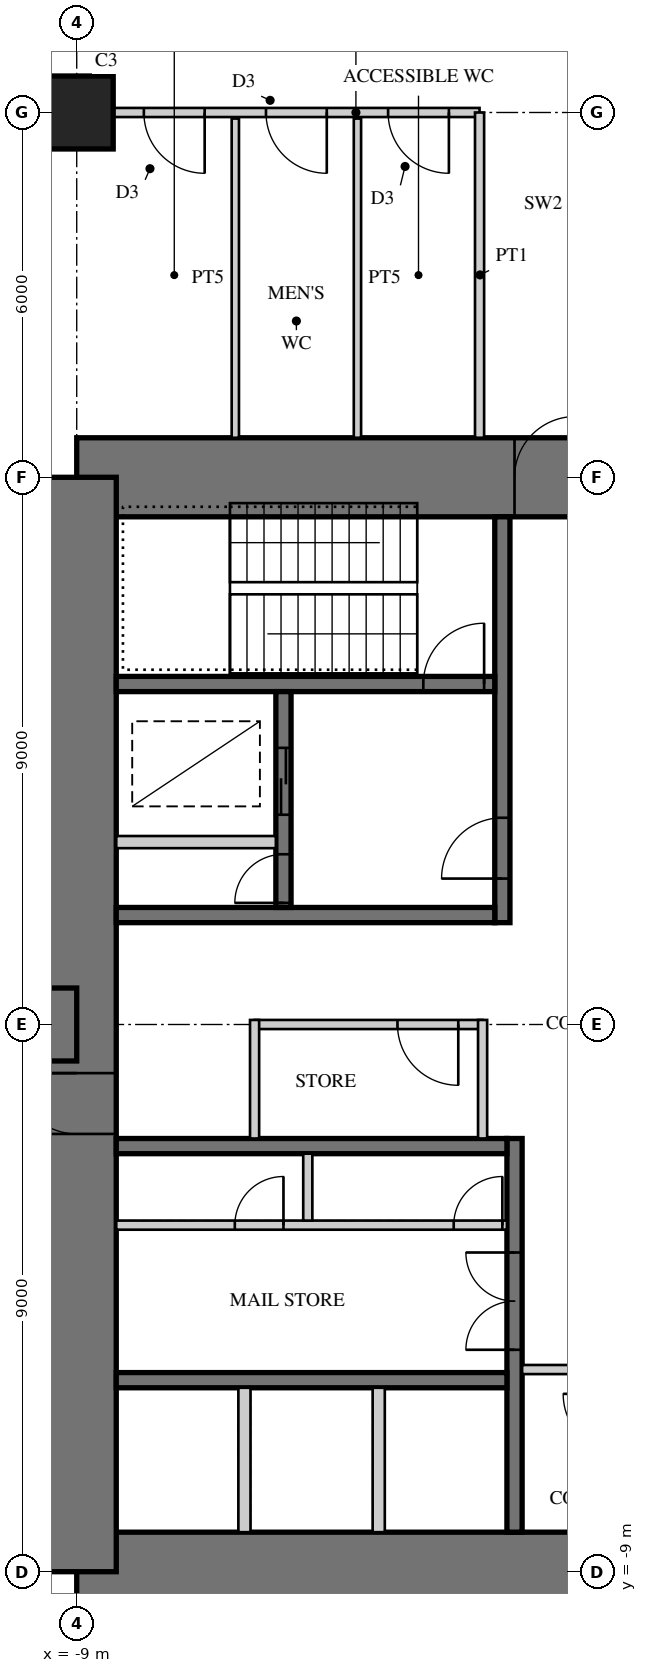
"""IFC4 building model, lengths in metres.
Left out: names, types, materials, properties, quantities, classifications, styles, units other than length and angle.
Written with IfcOpenShell. Run it as: python <this file> out.ifc"""

import sys

from ifc_helpers import new_model, si_unit, direction, frame, frame_2d, origin, origin_2d, place, context, subcontext, project, spatial, rectangle, extrude, element, fill, save


model = new_model("IFC4")
c1 = context("Model", 3, precision=1e-05, world=origin(), true_north=direction((0.0, 1.0)))
c2 = subcontext(c1, "Body", "Model", "MODEL_VIEW")
j1 = project(units=[si_unit("LENGTHUNIT", "METRE"), si_unit("PLANEANGLEUNIT", "RADIAN")], contexts=[c1])
p1 = place(None, origin())
s1 = spatial("IfcSite", under=j1, at=p1, CompositionType="ELEMENT")
p2 = place(p1, origin())
s2 = spatial("IfcBuilding", under=s1, at=p2, CompositionType="ELEMENT")
p3 = place(p2, frame((0.0, 0.0, 91.5)))
s3 = spatial("IfcBuildingStorey", under=s2, at=p3, CompositionType="ELEMENT", Elevation=91.5)
p4 = place(p3, frame((9.0, 9.0, 0.0), z_axis=(0.0, 0.0, 1.0), x_axis=(-1.0, 0.0, 0.0)))
e1 = element("IfcWall", 1, at=p4, inside=s3, PredefinedType="SHEAR", context=c2, shape_type="SweptSolid", body=[
    extrude(rectangle(XDim=18.0, YDim=1.3, at=frame_2d((9.0, 0.0))), origin(), (0.0, 0.0, 1.0), 4.0),
])
p5 = place(p4, frame((9.8, 0.0, 0.0)))
e2 = element("IfcOpeningElement", 2, at=p5, cuts=e1, PredefinedType="OPENING", context=c2, shape_type="SweptSolid", body=[
    extrude(rectangle(XDim=1.0, YDim=2.4, at=frame_2d((0.5, 1.2))), frame((0.0, 0.66, 0.0), z_axis=(0.0, -1.0, 0.0), x_axis=(1.0, 0.0, 0.0)), (0.0, 0.0, 1.0), 1.32),
])
p6 = place(p3, frame((-9.0, -9.0, 0.0), z_axis=(0.0, 0.0, 1.0), x_axis=(1.0, 0.0, 0.0)))
e3 = element("IfcWall", 3, at=p6, inside=s3, PredefinedType="SHEAR", context=c2, shape_type="SweptSolid", body=[
    extrude(rectangle(XDim=18.0, YDim=1.3, at=frame_2d((9.0, 0.0))), origin(), (0.0, 0.0, 1.0), 4.0),
])
p7 = place(p6, frame((9.8, 0.0, 0.0)))
e4 = element("IfcOpeningElement", 4, at=p7, cuts=e3, PredefinedType="OPENING", context=c2, shape_type="SweptSolid", body=[
    extrude(rectangle(XDim=1.0, YDim=2.4, at=frame_2d((0.5, 1.2))), frame((0.0, 0.66, 0.0), z_axis=(0.0, -1.0, 0.0), x_axis=(1.0, 0.0, 0.0)), (0.0, 0.0, 1.0), 1.32),
])
p8 = place(p3, frame((-9.0, 9.0, 0.0), z_axis=(0.0, 0.0, 1.0), x_axis=(0.0, -1.0, 0.0)))
e5 = element("IfcWall", 5, at=p8, inside=s3, PredefinedType="SHEAR", context=c2, shape_type="SweptSolid", body=[
    extrude(rectangle(XDim=18.0, YDim=1.3, at=frame_2d((9.0, 0.0))), origin(), (0.0, 0.0, 1.0), 4.0),
])
p9 = place(p8, frame((9.8, 0.0, 0.0)))
e6 = element("IfcOpeningElement", 6, at=p9, cuts=e5, PredefinedType="OPENING", context=c2, shape_type="SweptSolid", body=[
    extrude(rectangle(XDim=1.0, YDim=2.4, at=frame_2d((0.5, 1.2))), frame((0.0, 0.66, 0.0), z_axis=(0.0, -1.0, 0.0), x_axis=(1.0, 0.0, 0.0)), (0.0, 0.0, 1.0), 1.32),
])
p10 = place(p3, frame((-2.0, 1.675, 0.0), z_axis=(0.0, 0.0, 1.0), x_axis=(0.0, 1.0, 0.0)))
e7 = element("IfcWall", 7, at=p10, inside=s3, PredefinedType="SHEAR", context=c2, shape_type="SweptSolid", body=[
    extrude(rectangle(XDim=6.675, YDim=0.25, at=frame_2d((3.337, 0.0))), origin(), (0.0, 0.0, 1.0), 4.0),
])
p11 = place(p10, frame((0.725, 0.0, 0.0)))
e8 = element("IfcOpeningElement", 8, at=p11, cuts=e7, PredefinedType="OPENING", context=c2, shape_type="SweptSolid", body=[
    extrude(rectangle(XDim=1.0, YDim=2.1, at=frame_2d((0.5, 1.05))), frame((0.0, 0.135, 0.0), z_axis=(0.0, -1.0, 0.0), x_axis=(1.0, 0.0, 0.0)), (0.0, 0.0, 1.0), 0.27),
])
p12 = place(p3, frame((-2.125, 1.8, 0.0), z_axis=(0.0, 0.0, 1.0), x_axis=(-1.0, 0.0, 0.0)))
e9 = element("IfcWall", 9, at=p12, inside=s3, PredefinedType="SHEAR", context=c2, shape_type="SweptSolid", body=[
    extrude(rectangle(XDim=6.225, YDim=0.25, at=frame_2d((3.113, 0.0))), origin(), (0.0, 0.0, 1.0), 4.0),
])
p13 = place(p3, frame((-2.125, 5.6, 0.0), z_axis=(0.0, 0.0, 1.0), x_axis=(-1.0, 0.0, 0.0)))
e10 = element("IfcWall", 10, at=p13, inside=s3, PredefinedType="SHEAR", context=c2, shape_type="SweptSolid", body=[
    extrude(rectangle(XDim=6.225, YDim=0.25, at=frame_2d((3.113, 0.0))), origin(), (0.0, 0.0, 1.0), 4.0),
])
p14 = place(p13, frame((0.175, 0.0, 0.0)))
e11 = element("IfcOpeningElement", 11, at=p14, cuts=e10, PredefinedType="OPENING", context=c2, shape_type="SweptSolid", body=[
    extrude(rectangle(XDim=1.0, YDim=2.1, at=frame_2d((0.5, 1.05))), frame((0.0, 0.135, 0.0), z_axis=(0.0, -1.0, 0.0), x_axis=(1.0, 0.0, 0.0)), (0.0, 0.0, 1.0), 0.27),
])
p15 = place(p3, frame((-5.6, 1.925, 0.0), z_axis=(0.0, 0.0, 1.0), x_axis=(0.0, 1.0, 0.0)))
e12 = element("IfcWall", 12, at=p15, inside=s3, PredefinedType="SHEAR", context=c2, shape_type="SweptSolid", body=[
    extrude(rectangle(XDim=3.55, YDim=0.25, at=frame_2d((1.775, 0.0))), origin(), (0.0, 0.0, 1.0), 4.0),
])
p16 = place(p15, frame((1.525, 0.0, 0.0)))
e13 = element("IfcOpeningElement", 13, at=p16, cuts=e12, PredefinedType="OPENING", context=c2, shape_type="SweptSolid", body=[
    extrude(rectangle(XDim=1.1, YDim=2.2, at=frame_2d((0.55, 1.1))), frame((0.0, 0.135, 0.0), z_axis=(0.0, -1.0, 0.0), x_axis=(1.0, 0.0, 0.0)), (0.0, 0.0, 1.0), 0.27),
])
p17 = place(p15, frame((0.075, 0.0, 0.0)))
e14 = element("IfcOpeningElement", 14, at=p17, cuts=e12, PredefinedType="OPENING", context=c2, shape_type="SweptSolid", body=[
    extrude(rectangle(XDim=0.8, YDim=2.1, at=frame_2d((0.4, 1.05))), frame((0.0, 0.135, 0.0), z_axis=(0.0, -1.0, 0.0), x_axis=(1.0, 0.0, 0.0)), (0.0, 0.0, 1.0), 0.27),
])
p18 = place(p3, frame((-5.725, 3.0, 0.0), z_axis=(0.0, 0.0, 1.0), x_axis=(-1.0, 0.0, 0.0)))
e15 = element("IfcWall", 15, at=p18, inside=s3, PredefinedType="PARTITIONING", context=c2, shape_type="SweptSolid", body=[
    extrude(rectangle(XDim=2.625, YDim=0.2, at=frame_2d((1.312, 0.0))), origin(), (0.0, 0.0, 1.0), 4.0),
])
p19 = place(p3, frame((-1.8, -1.875, 0.0), z_axis=(0.0, 0.0, 1.0), x_axis=(0.0, -1.0, 0.0)))
e16 = element("IfcWall", 16, at=p19, inside=s3, PredefinedType="SHEAR", context=c2, shape_type="SweptSolid", body=[
    extrude(rectangle(XDim=6.475, YDim=0.25, at=frame_2d((3.238, 0.0))), origin(), (0.0, 0.0, 1.0), 4.0),
])
p20 = place(p19, frame((1.875, 0.0, 0.0)))
e17 = element("IfcOpeningElement", 17, at=p20, cuts=e16, PredefinedType="OPENING", context=c2, shape_type="SweptSolid", body=[
    extrude(rectangle(XDim=1.6, YDim=2.4, at=frame_2d((0.8, 1.2))), frame((0.0, 0.135, 0.0), z_axis=(0.0, -1.0, 0.0), x_axis=(1.0, 0.0, 0.0)), (0.0, 0.0, 1.0), 0.27),
])
for number, where, z_axis, x_axis in (
    (18, (-1.925, -2.0, 0.0), (0.0, 0.0, 1.0), (-1.0, 0.0, 0.0)),
    (19, (-1.925, -5.85, 0.0), (0.0, 0.0, 1.0), (-1.0, 0.0, 0.0)),
):
    element("IfcWall", number, at=place(p3, frame(where, z_axis=z_axis, x_axis=x_axis)), inside=s3, PredefinedType="SHEAR", context=c2, shape_type="SweptSolid", body=[
        extrude(rectangle(XDim=6.425, YDim=0.25, at=frame_2d((3.212, 0.0))), origin(), (0.0, 0.0, 1.0), 4.0),
    ])
p21 = place(p3, frame((-1.925, -3.3, 0.0), z_axis=(0.0, 0.0, 1.0), x_axis=(-1.0, 0.0, 0.0)))
e20 = element("IfcWall", 20, at=p21, inside=s3, PredefinedType="PARTITIONING", context=c2, shape_type="SweptSolid", body=[
    extrude(rectangle(XDim=6.425, YDim=0.15, at=frame_2d((3.212, 0.0))), origin(), (0.0, 0.0, 1.0), 4.0),
])
p22 = place(p21, frame((0.075, 0.0, 0.0)))
e21 = element("IfcOpeningElement", 21, at=p22, cuts=e20, PredefinedType="OPENING", context=c2, shape_type="SweptSolid", body=[
    extrude(rectangle(XDim=0.8, YDim=2.1, at=frame_2d((0.4, 1.05))), frame((0.0, 0.085, 0.0), z_axis=(0.0, -1.0, 0.0), x_axis=(1.0, 0.0, 0.0)), (0.0, 0.0, 1.0), 0.17),
])
p23 = place(p21, frame((3.675, 0.0, 0.0)))
e22 = element("IfcOpeningElement", 22, at=p23, cuts=e20, PredefinedType="OPENING", context=c2, shape_type="SweptSolid", body=[
    extrude(rectangle(XDim=0.8, YDim=2.1, at=frame_2d((0.4, 1.05))), frame((0.0, 0.085, 0.0), z_axis=(0.0, -1.0, 0.0), x_axis=(1.0, 0.0, 0.0)), (0.0, 0.0, 1.0), 0.17),
])
p24 = place(p3, frame((-5.2, -2.125, 0.0), z_axis=(0.0, 0.0, 1.0), x_axis=(0.0, -1.0, 0.0)))
e23 = element("IfcWall", 23, at=p24, inside=s3, PredefinedType="PARTITIONING", context=c2, shape_type="SweptSolid", body=[
    extrude(rectangle(XDim=1.1, YDim=0.15, at=frame_2d((0.55, 0.0))), origin(), (0.0, 0.0, 1.0), 4.0),
])
for number, where, z_axis, x_axis in (
    (24, (-4.033, -5.975, 0.0), (0.0, 0.0, 1.0), (0.0, -1.0, 0.0)),
    (25, (-6.242, -5.975, 0.0), (0.0, 0.0, 1.0), (0.0, -1.0, 0.0)),
):
    element("IfcWall", number, at=place(p3, frame(where, z_axis=z_axis, x_axis=x_axis)), inside=s3, PredefinedType="PARTITIONING", context=c2, shape_type="SweptSolid", body=[
        extrude(rectangle(XDim=2.375, YDim=0.2, at=frame_2d((1.188, 0.0))), origin(), (0.0, 0.0, 1.0), 4.0),
    ])
p25 = place(p3, frame((-9.0, 0.0, 0.0), z_axis=(0.0, 0.0, 1.0), x_axis=(-1.0, 0.0, 0.0)))
e26 = element("IfcWall", 26, at=p25, inside=s3, PredefinedType="SHEAR", context=c2, shape_type="SweptSolid", body=[
    extrude(rectangle(XDim=18.0, YDim=1.2, at=frame_2d((9.0, 0.0))), origin(), (0.0, 0.0, 1.0), 4.0),
])
p26 = place(p25, frame((9.9, 0.0, 0.0)))
e27 = element("IfcOpeningElement", 27, at=p26, cuts=e26, PredefinedType="OPENING", context=c2, shape_type="SweptSolid", body=[
    extrude(rectangle(XDim=1.0, YDim=2.2, at=frame_2d((0.5, 1.1))), frame((0.0, 0.61, 0.0), z_axis=(0.0, -1.0, 0.0), x_axis=(1.0, 0.0, 0.0)), (0.0, 0.0, 1.0), 1.22),
])
p27 = place(p3, frame((-9.0, 15.0, 0.0), z_axis=(0.0, 0.0, 1.0), x_axis=(1.0, 0.0, 0.0)))
e28 = element("IfcColumn", 28, at=p27, inside=s3, PredefinedType="COLUMN", context=c2, shape_type="SweptSolid", body=[
    extrude(rectangle(XDim=1.2, YDim=1.2, at=origin_2d()), origin(), (0.0, 0.0, 1.0), 4.0),
])
p28 = place(p3, frame((-2.325, 0.0, 0.0), z_axis=(0.0, 0.0, 1.0), x_axis=(-1.0, 0.0, 0.0)))
e29 = element("IfcWall", 29, at=p28, inside=s3, PredefinedType="PARTITIONING", context=c2, shape_type="SweptSolid", body=[
    extrude(rectangle(XDim=3.75, YDim=0.15, at=frame_2d((1.875, 0.0))), origin(), (0.0, 0.0, 1.0), 3.75),
])
p29 = place(p28, frame((0.4, 0.0, 0.0)))
e30 = element("IfcOpeningElement", 30, at=p29, cuts=e29, PredefinedType="OPENING", context=c2, shape_type="SweptSolid", body=[
    extrude(rectangle(XDim=1.0, YDim=2.1, at=frame_2d((0.5, 1.05))), frame((0.0, 0.085, 0.0), z_axis=(0.0, -1.0, 0.0), x_axis=(1.0, 0.0, 0.0)), (0.0, 0.0, 1.0), 0.17),
])
for number, where, z_axis, x_axis in (
    (31, (-2.325, -1.875, 0.0), (0.0, 0.0, 1.0), (0.0, 1.0, 0.0)),
    (32, (-6.075, 0.075, 0.0), (0.0, 0.0, 1.0), (0.0, -1.0, 0.0)),
):
    element("IfcWall", number, at=place(p3, frame(where, z_axis=z_axis, x_axis=x_axis)), inside=s3, PredefinedType="PARTITIONING", context=c2, shape_type="SweptSolid", body=[
        extrude(rectangle(XDim=1.95, YDim=0.15, at=frame_2d((0.975, 0.0))), origin(), (0.0, 0.0, 1.0), 3.75),
    ])
p30 = place(p3, frame((-1.675, -5.675, 0.0), z_axis=(0.0, 0.0, 1.0), x_axis=(1.0, 0.0, 0.0)))
e33 = element("IfcWall", 33, at=p30, inside=s3, PredefinedType="PARTITIONING", context=c2, shape_type="SweptSolid", body=[
    extrude(rectangle(XDim=1.75, YDim=0.15, at=frame_2d((0.875, 0.0))), origin(), (0.0, 0.0, 1.0), 3.75),
])
p31 = place(p3, frame((-2.375, 15.0, 0.0), z_axis=(0.0, 0.0, 1.0), x_axis=(-1.0, 0.0, 0.0)))
e34 = element("IfcWall", 34, at=p31, inside=s3, PredefinedType="PARTITIONING", context=c2, shape_type="SweptSolid", body=[
    extrude(rectangle(XDim=6.025, YDim=0.15, at=frame_2d((3.012, 0.0))), origin(), (0.0, 0.0, 1.0), 2.7),
])
p32 = place(p31, frame((0.504, 0.0, 0.0)))
e35 = element("IfcOpeningElement", 35, at=p32, cuts=e34, PredefinedType="OPENING", context=c2, shape_type="SweptSolid", body=[
    extrude(rectangle(XDim=1.0, YDim=2.1, at=frame_2d((0.5, 1.05))), frame((0.0, 0.085, 0.0), z_axis=(0.0, -1.0, 0.0), x_axis=(1.0, 0.0, 0.0)), (0.0, 0.0, 1.0), 0.17),
])
p33 = place(p31, frame((2.512, 0.0, 0.0)))
e36 = element("IfcOpeningElement", 36, at=p33, cuts=e34, PredefinedType="OPENING", context=c2, shape_type="SweptSolid", body=[
    extrude(rectangle(XDim=1.0, YDim=2.1, at=frame_2d((0.5, 1.05))), frame((0.0, 0.085, 0.0), z_axis=(0.0, -1.0, 0.0), x_axis=(1.0, 0.0, 0.0)), (0.0, 0.0, 1.0), 0.17),
])
p34 = place(p31, frame((4.521, 0.0, 0.0)))
e37 = element("IfcOpeningElement", 37, at=p34, cuts=e34, PredefinedType="OPENING", context=c2, shape_type="SweptSolid", body=[
    extrude(rectangle(XDim=1.0, YDim=2.1, at=frame_2d((0.5, 1.05))), frame((0.0, 0.085, 0.0), z_axis=(0.0, -1.0, 0.0), x_axis=(1.0, 0.0, 0.0)), (0.0, 0.0, 1.0), 0.17),
])
p35 = place(p3, frame((-2.375, 9.65, 0.0), z_axis=(0.0, 0.0, 1.0), x_axis=(0.0, 1.0, 0.0)))
e38 = element("IfcWall", 38, at=p35, inside=s3, PredefinedType="PARTITIONING", context=c2, shape_type="SweptSolid", body=[
    extrude(rectangle(XDim=5.35, YDim=0.15, at=frame_2d((2.675, 0.0))), origin(), (0.0, 0.0, 1.0), 3.75),
])
for number, where, z_axis, x_axis in (
    (39, (-4.383, 9.65, 0.0), (0.0, 0.0, 1.0), (0.0, 1.0, 0.0)),
    (40, (-6.392, 9.65, 0.0), (0.0, 0.0, 1.0), (0.0, 1.0, 0.0)),
):
    element("IfcWall", number, at=place(p3, frame(where, z_axis=z_axis, x_axis=x_axis)), inside=s3, PredefinedType="PLUMBINGWALL", context=c2, shape_type="SweptSolid", body=[
        extrude(rectangle(XDim=5.25, YDim=0.12, at=frame_2d((2.625, 0.0))), origin(), (0.0, 0.0, 1.0), 3.75),
    ])
p36 = place(p29, origin())
e41 = element("IfcDoor", 41, at=p36, inside=s3, OperationType="SINGLE_SWING_LEFT", PredefinedType="DOOR", context=c2, shape_type="SweptSolid", body=[
    extrude(rectangle(XDim=1.0, YDim=2.1, at=frame_2d((0.5, 1.05))), frame((0.0, 0.025, 0.0), z_axis=(0.0, -1.0, 0.0), x_axis=(1.0, 0.0, 0.0)), (0.0, 0.0, 1.0), 0.05),
])
fill(e30, e41)
p37 = place(p32, origin())
e42 = element("IfcDoor", 42, at=p37, inside=s3, OperationType="SINGLE_SWING_LEFT", PredefinedType="DOOR", context=c2, shape_type="SweptSolid", body=[
    extrude(rectangle(XDim=1.0, YDim=2.1, at=frame_2d((0.5, 1.05))), frame((0.0, 0.025, 0.0), z_axis=(0.0, -1.0, 0.0), x_axis=(1.0, 0.0, 0.0)), (0.0, 0.0, 1.0), 0.05),
])
fill(e35, e42)
p38 = place(p33, origin())
e43 = element("IfcDoor", 43, at=p38, inside=s3, OperationType="SINGLE_SWING_LEFT", PredefinedType="DOOR", context=c2, shape_type="SweptSolid", body=[
    extrude(rectangle(XDim=1.0, YDim=2.1, at=frame_2d((0.5, 1.05))), frame((0.0, 0.025, 0.0), z_axis=(0.0, -1.0, 0.0), x_axis=(1.0, 0.0, 0.0)), (0.0, 0.0, 1.0), 0.05),
])
fill(e36, e43)
p39 = place(p34, origin())
e44 = element("IfcDoor", 44, at=p39, inside=s3, OperationType="SINGLE_SWING_LEFT", PredefinedType="DOOR", context=c2, shape_type="SweptSolid", body=[
    extrude(rectangle(XDim=1.0, YDim=2.1, at=frame_2d((0.5, 1.05))), frame((0.0, 0.025, 0.0), z_axis=(0.0, -1.0, 0.0), x_axis=(1.0, 0.0, 0.0)), (0.0, 0.0, 1.0), 0.05),
])
fill(e37, e44)
p40 = place(p5, frame((1.0, 0.0, 0.0), z_axis=(0.0, 0.0, 1.0), x_axis=(-1.0, 0.0, 0.0)))
e45 = element("IfcDoor", 45, at=p40, inside=s3, OperationType="SINGLE_SWING_RIGHT", PredefinedType="DOOR", context=c2, shape_type="SweptSolid", body=[
    extrude(rectangle(XDim=1.0, YDim=2.4, at=frame_2d((0.5, 1.2))), frame((0.0, -0.005, 0.0), z_axis=(0.0, -1.0, 0.0), x_axis=(1.0, 0.0, 0.0)), (0.0, 0.0, 1.0), 0.05),
])
fill(e2, e45)
p41 = place(p9, frame((1.0, 0.0, 0.0), z_axis=(0.0, 0.0, 1.0), x_axis=(-1.0, 0.0, 0.0)))
e46 = element("IfcDoor", 46, at=p41, inside=s3, OperationType="SINGLE_SWING_RIGHT", PredefinedType="DOOR", context=c2, shape_type="SweptSolid", body=[
    extrude(rectangle(XDim=1.0, YDim=2.4, at=frame_2d((0.5, 1.2))), frame((0.0, -0.005, 0.0), z_axis=(0.0, -1.0, 0.0), x_axis=(1.0, 0.0, 0.0)), (0.0, 0.0, 1.0), 0.05),
])
fill(e6, e46)
p42 = place(p11, origin())
e47 = element("IfcDoor", 47, at=p42, inside=s3, OperationType="SINGLE_SWING_LEFT", PredefinedType="DOOR", context=c2, shape_type="SweptSolid", body=[
    extrude(rectangle(XDim=1.0, YDim=2.1, at=frame_2d((0.5, 1.05))), frame((0.0, 0.025, 0.0), z_axis=(0.0, -1.0, 0.0), x_axis=(1.0, 0.0, 0.0)), (0.0, 0.0, 1.0), 0.05),
])
fill(e8, e47)
p43 = place(p14, frame((1.0, 0.0, 0.0), z_axis=(0.0, 0.0, 1.0), x_axis=(-1.0, 0.0, 0.0)))
e48 = element("IfcDoor", 48, at=p43, inside=s3, OperationType="SINGLE_SWING_RIGHT", PredefinedType="DOOR", context=c2, shape_type="SweptSolid", body=[
    extrude(rectangle(XDim=1.0, YDim=2.1, at=frame_2d((0.5, 1.05))), frame((0.0, 0.025, 0.0), z_axis=(0.0, -1.0, 0.0), x_axis=(1.0, 0.0, 0.0)), (0.0, 0.0, 1.0), 0.05),
])
fill(e11, e48)
p44 = place(p16, origin())
e49 = element("IfcDoor", 49, at=p44, inside=s3, OperationType="DOUBLE_DOOR_SLIDING", PredefinedType="DOOR", context=c2, shape_type="SweptSolid", body=[
    extrude(rectangle(XDim=1.1, YDim=2.2, at=frame_2d((0.55, 1.1))), frame((0.0, 0.025, 0.0), z_axis=(0.0, -1.0, 0.0), x_axis=(1.0, 0.0, 0.0)), (0.0, 0.0, 1.0), 0.05),
])
fill(e13, e49)
p45 = place(p17, origin())
e50 = element("IfcDoor", 50, at=p45, inside=s3, OperationType="SINGLE_SWING_LEFT", PredefinedType="DOOR", context=c2, shape_type="SweptSolid", body=[
    extrude(rectangle(XDim=0.8, YDim=2.1, at=frame_2d((0.4, 1.05))), frame((0.0, 0.025, 0.0), z_axis=(0.0, -1.0, 0.0), x_axis=(1.0, 0.0, 0.0)), (0.0, 0.0, 1.0), 0.05),
])
fill(e14, e50)
p46 = place(p20, frame((1.6, 0.0, 0.0), z_axis=(0.0, 0.0, 1.0), x_axis=(-1.0, 0.0, 0.0)))
e51 = element("IfcDoor", 51, at=p46, inside=s3, OperationType="DOUBLE_DOOR_SINGLE_SWING", PredefinedType="DOOR", context=c2, shape_type="SweptSolid", body=[
    extrude(rectangle(XDim=1.6, YDim=2.4, at=frame_2d((0.8, 1.2))), frame((0.0, 0.025, 0.0), z_axis=(0.0, -1.0, 0.0), x_axis=(1.0, 0.0, 0.0)), (0.0, 0.0, 1.0), 0.05),
])
fill(e17, e51)
p47 = place(p22, frame((0.8, 0.0, 0.0), z_axis=(0.0, 0.0, 1.0), x_axis=(-1.0, 0.0, 0.0)))
e52 = element("IfcDoor", 52, at=p47, inside=s3, OperationType="SINGLE_SWING_RIGHT", PredefinedType="DOOR", context=c2, shape_type="SweptSolid", body=[
    extrude(rectangle(XDim=0.8, YDim=2.1, at=frame_2d((0.4, 1.05))), frame((0.0, 0.025, 0.0), z_axis=(0.0, -1.0, 0.0), x_axis=(1.0, 0.0, 0.0)), (0.0, 0.0, 1.0), 0.05),
])
fill(e21, e52)
p48 = place(p23, frame((0.8, 0.0, 0.0), z_axis=(0.0, 0.0, 1.0), x_axis=(-1.0, 0.0, 0.0)))
e53 = element("IfcDoor", 53, at=p48, inside=s3, OperationType="SINGLE_SWING_RIGHT", PredefinedType="DOOR", context=c2, shape_type="SweptSolid", body=[
    extrude(rectangle(XDim=0.8, YDim=2.1, at=frame_2d((0.4, 1.05))), frame((0.0, 0.025, 0.0), z_axis=(0.0, -1.0, 0.0), x_axis=(1.0, 0.0, 0.0)), (0.0, 0.0, 1.0), 0.05),
])
fill(e22, e53)
save(model, sys.argv[1])
